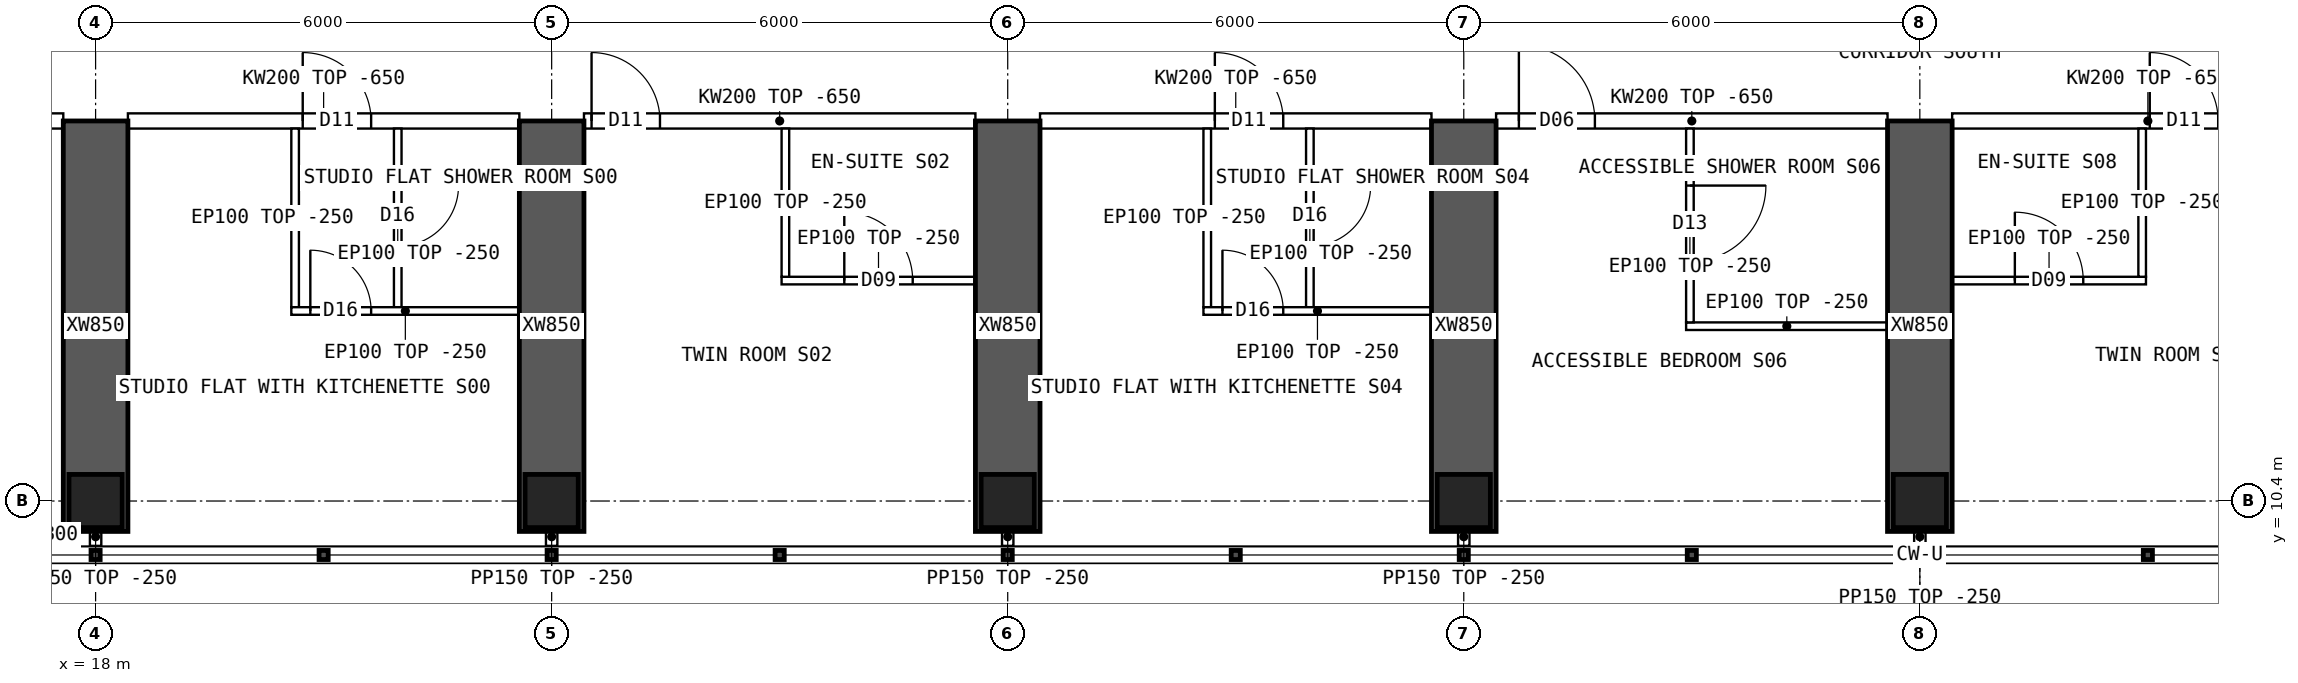
"""IFC4 building model, lengths in metres.
Left out: names, types, materials, properties, quantities, classifications, styles, units other than length and angle.
Written with IfcOpenShell. Run it as: python <this file> out.ifc"""

import sys

from ifc_helpers import new_model, si_unit, direction, frame, frame_2d, origin, origin_2d, place, context, subcontext, project, spatial, polyline, rectangle, hollow_rectangle, outline, extrude, element, fill, save


model = new_model("IFC4")
c1 = context("Model", 3, precision=1e-05, world=origin(), true_north=direction((0.0, 1.0)))
c2 = subcontext(c1, "Body", "Model", "MODEL_VIEW")
j1 = project(units=[si_unit("LENGTHUNIT", "METRE"), si_unit("PLANEANGLEUNIT", "RADIAN")], contexts=[c1])
p1 = place(None, origin())
s1 = spatial("IfcSite", under=j1, at=p1, CompositionType="ELEMENT")
p2 = place(p1, origin())
s2 = spatial("IfcBuilding", under=s1, at=p2, CompositionType="ELEMENT")
p3 = place(p2, frame((0.0, 0.0, 163.6)))
s3 = spatial("IfcBuildingStorey", under=s2, at=p3, CompositionType="ELEMENT", Elevation=163.6)
for number, where, z_axis, x_axis in (
    (1, (18.0, 10.4, 0.0), (0.0, 0.0, 1.0), (1.0, 0.0, 0.0)),
    (2, (24.0, 10.4, 0.0), (0.0, 0.0, 1.0), (1.0, 0.0, 0.0)),
    (3, (30.0, 10.4, 0.0), (0.0, 0.0, 1.0), (1.0, 0.0, 0.0)),
    (4, (36.0, 10.4, 0.0), (0.0, 0.0, 1.0), (1.0, 0.0, 0.0)),
    (5, (42.0, 10.4, 0.0), (0.0, 0.0, 1.0), (1.0, 0.0, 0.0)),
):
    element("IfcColumn", number, at=place(p3, frame(where, z_axis=z_axis, x_axis=x_axis)), inside=s3, PredefinedType="COLUMN", context=c2, shape_type="SweptSolid", body=[
        extrude(hollow_rectangle(XDim=0.7, YDim=0.7, WallThickness=0.07, at=origin_2d()), origin(), (0.0, 0.0, 1.0), 3.75),
    ])
for number, where, z_axis, x_axis in (
    (6, (18.0, 10.0, 0.0), (0.0, 0.0, 1.0), (0.0, 1.0, 0.0)),
    (7, (24.0, 10.0, 0.0), (0.0, 0.0, 1.0), (0.0, 1.0, 0.0)),
    (8, (30.0, 10.0, 0.0), (0.0, 0.0, 1.0), (0.0, 1.0, 0.0)),
    (9, (36.0, 10.0, 0.0), (0.0, 0.0, 1.0), (0.0, 1.0, 0.0)),
    (10, (42.0, 10.0, 0.0), (0.0, 0.0, 1.0), (0.0, 1.0, 0.0)),
):
    element("IfcWall", number, at=place(p3, frame(where, z_axis=z_axis, x_axis=x_axis)), inside=s3, PredefinedType="SHEAR", context=c2, shape_type="SweptSolid", body=[
        extrude(rectangle(XDim=5.4, YDim=0.85, at=frame_2d((2.7, 0.0))), origin(), (0.0, 0.0, 1.0), 3.75),
    ])
p4 = place(p3, frame((17.2, 9.95, 0.0), z_axis=(0.0, 0.0, 1.0), x_axis=(1.0, 0.0, 0.0)))
e11 = element("IfcWall", 11, at=p4, inside=s3, PredefinedType="SOLIDWALL", context=c2, shape_type="SweptSolid", body=[
    extrude(rectangle(XDim=0.375, YDim=0.3, at=frame_2d((0.188, 0.0))), origin(), (0.0, 0.0, 1.0), 3.5),
])
p5 = place(p3, frame((15.6, 15.4, 0.0), z_axis=(0.0, 0.0, 1.0), x_axis=(1.0, 0.0, 0.0)))
e12 = element("IfcWall", 12, at=p5, inside=s3, PredefinedType="SOLIDWALL", context=c2, shape_type="SweptSolid", body=[
    extrude(rectangle(XDim=1.975, YDim=0.2, at=frame_2d((0.987, 0.0))), origin(), (0.0, 0.0, 1.0), 3.5),
])
p6 = place(p5, frame((0.875, 0.0, 0.0)))
e13 = element("IfcOpeningElement", 13, at=p6, cuts=e12, PredefinedType="OPENING", context=c2, shape_type="SweptSolid", body=[
    extrude(rectangle(XDim=0.9, YDim=2.1, at=frame_2d((0.45, 1.05))), frame((0.0, 0.11, 0.0), z_axis=(0.0, -1.0, 0.0), x_axis=(1.0, 0.0, 0.0)), (0.0, 0.0, 1.0), 0.22),
])
p7 = place(p3, frame((18.425, 15.4, 0.0), z_axis=(0.0, 0.0, 1.0), x_axis=(1.0, 0.0, 0.0)))
e14 = element("IfcWall", 14, at=p7, inside=s3, PredefinedType="SOLIDWALL", context=c2, shape_type="SweptSolid", body=[
    extrude(outline(polyline([(0.0, 0.0), (5.15, 0.0), (5.15, 3.1), (0.0, 3.1), (0.0, 0.0)])), frame((0.0, 0.1, 0.0), z_axis=(0.0, -1.0, 0.0), x_axis=(1.0, 0.0, 0.0)), (0.0, 0.0, 1.0), 0.2),
])
p8 = place(p7, frame((2.3, 0.0, 0.0)))
e15 = element("IfcOpeningElement", 15, at=p8, cuts=e14, PredefinedType="OPENING", context=c2, shape_type="SweptSolid", body=[
    extrude(rectangle(XDim=0.9, YDim=2.1, at=frame_2d((0.45, 1.05))), frame((0.0, 0.11, 0.0), z_axis=(0.0, -1.0, 0.0), x_axis=(1.0, 0.0, 0.0)), (0.0, 0.0, 1.0), 0.22),
])
p9 = place(p3, frame((24.425, 15.4, 0.0), z_axis=(0.0, 0.0, 1.0), x_axis=(1.0, 0.0, 0.0)))
e16 = element("IfcWall", 16, at=p9, inside=s3, PredefinedType="SOLIDWALL", context=c2, shape_type="SweptSolid", body=[
    extrude(outline(polyline([(0.0, 0.0), (5.15, 0.0), (5.15, 3.1), (0.0, 3.1), (0.0, 0.0)])), frame((0.0, 0.1, 0.0), z_axis=(0.0, -1.0, 0.0), x_axis=(1.0, 0.0, 0.0)), (0.0, 0.0, 1.0), 0.2),
])
p10 = place(p9, frame((0.1, 0.0, 0.0)))
e17 = element("IfcOpeningElement", 17, at=p10, cuts=e16, PredefinedType="OPENING", context=c2, shape_type="SweptSolid", body=[
    extrude(rectangle(XDim=0.9, YDim=2.1, at=frame_2d((0.45, 1.05))), frame((0.0, 0.11, 0.0), z_axis=(0.0, -1.0, 0.0), x_axis=(1.0, 0.0, 0.0)), (0.0, 0.0, 1.0), 0.22),
])
p11 = place(p3, frame((30.425, 15.4, 0.0), z_axis=(0.0, 0.0, 1.0), x_axis=(1.0, 0.0, 0.0)))
e18 = element("IfcWall", 18, at=p11, inside=s3, PredefinedType="SOLIDWALL", context=c2, shape_type="SweptSolid", body=[
    extrude(outline(polyline([(0.0, 0.0), (5.15, 0.0), (5.15, 3.1), (0.0, 3.1), (0.0, 0.0)])), frame((0.0, 0.1, 0.0), z_axis=(0.0, -1.0, 0.0), x_axis=(1.0, 0.0, 0.0)), (0.0, 0.0, 1.0), 0.2),
])
p12 = place(p11, frame((2.3, 0.0, 0.0)))
e19 = element("IfcOpeningElement", 19, at=p12, cuts=e18, PredefinedType="OPENING", context=c2, shape_type="SweptSolid", body=[
    extrude(rectangle(XDim=0.9, YDim=2.1, at=frame_2d((0.45, 1.05))), frame((0.0, 0.11, 0.0), z_axis=(0.0, -1.0, 0.0), x_axis=(1.0, 0.0, 0.0)), (0.0, 0.0, 1.0), 0.22),
])
p13 = place(p3, frame((36.425, 15.4, 0.0), z_axis=(0.0, 0.0, 1.0), x_axis=(1.0, 0.0, 0.0)))
e20 = element("IfcWall", 20, at=p13, inside=s3, PredefinedType="SOLIDWALL", context=c2, shape_type="SweptSolid", body=[
    extrude(outline(polyline([(0.0, 0.0), (5.15, 0.0), (5.15, 3.1), (0.0, 3.1), (0.0, 0.0)])), frame((0.0, 0.1, 0.0), z_axis=(0.0, -1.0, 0.0), x_axis=(1.0, 0.0, 0.0)), (0.0, 0.0, 1.0), 0.2),
])
p14 = place(p13, frame((0.3, 0.0, 0.0)))
e21 = element("IfcOpeningElement", 21, at=p14, cuts=e20, PredefinedType="OPENING", context=c2, shape_type="SweptSolid", body=[
    extrude(rectangle(XDim=1.0, YDim=2.1, at=frame_2d((0.5, 1.05))), frame((0.0, 0.11, 0.0), z_axis=(0.0, -1.0, 0.0), x_axis=(1.0, 0.0, 0.0)), (0.0, 0.0, 1.0), 0.22),
])
p15 = place(p3, frame((42.425, 15.4, 0.0), z_axis=(0.0, 0.0, 1.0), x_axis=(1.0, 0.0, 0.0)))
e22 = element("IfcWall", 22, at=p15, inside=s3, PredefinedType="SOLIDWALL", context=c2, shape_type="SweptSolid", body=[
    extrude(outline(polyline([(0.0, 0.0), (5.15, 0.0), (5.15, 3.1), (0.0, 3.1), (0.0, 0.0)])), frame((0.0, 0.1, 0.0), z_axis=(0.0, -1.0, 0.0), x_axis=(1.0, 0.0, 0.0)), (0.0, 0.0, 1.0), 0.2),
])
p16 = place(p15, frame((2.6, 0.0, 0.0)))
e23 = element("IfcOpeningElement", 23, at=p16, cuts=e22, PredefinedType="OPENING", context=c2, shape_type="SweptSolid", body=[
    extrude(rectangle(XDim=0.9, YDim=2.1, at=frame_2d((0.45, 1.05))), frame((0.0, 0.11, 0.0), z_axis=(0.0, -1.0, 0.0), x_axis=(1.0, 0.0, 0.0)), (0.0, 0.0, 1.0), 0.22),
])
p17 = place(p3, frame((23.575, 12.9, 0.0), z_axis=(0.0, 0.0, 1.0), x_axis=(-1.0, 0.0, 0.0)))
e24 = element("IfcWall", 24, at=p17, inside=s3, PredefinedType="PARTITIONING", context=c2, shape_type="SweptSolid", body=[
    extrude(rectangle(XDim=3.0, YDim=0.1, at=frame_2d((1.5, 0.0))), origin(), (0.0, 0.0, 1.0), 3.5),
])
p18 = place(p17, frame((1.95, 0.0, 0.0)))
e25 = element("IfcOpeningElement", 25, at=p18, cuts=e24, PredefinedType="OPENING", context=c2, shape_type="SweptSolid", body=[
    extrude(rectangle(XDim=0.8, YDim=2.1, at=frame_2d((0.4, 1.05))), frame((0.0, 0.06, 0.0), z_axis=(0.0, -1.0, 0.0), x_axis=(1.0, 0.0, 0.0)), (0.0, 0.0, 1.0), 0.12),
])
p19 = place(p3, frame((20.625, 12.95, 0.0), z_axis=(0.0, 0.0, 1.0), x_axis=(0.0, 1.0, 0.0)))
e26 = element("IfcWall", 26, at=p19, inside=s3, PredefinedType="PARTITIONING", context=c2, shape_type="SweptSolid", body=[
    extrude(outline(polyline([(0.0, 0.0), (2.35, 0.0), (2.35, 3.1), (2.302, 3.1), (2.3, 3.5), (0.0, 3.5), (0.0, 0.0)])), frame((0.0, 0.05, 0.0), z_axis=(0.0, -1.0, 0.0), x_axis=(1.0, 0.0, 0.0)), (0.0, 0.0, 1.0), 0.1),
])
p20 = place(p3, frame((21.975, 12.95, 0.0), z_axis=(0.0, 0.0, 1.0), x_axis=(0.0, 1.0, 0.0)))
e27 = element("IfcWall", 27, at=p20, inside=s3, PredefinedType="PARTITIONING", context=c2, shape_type="SweptSolid", body=[
    extrude(outline(polyline([(0.0, 0.0), (2.35, 0.0), (2.35, 3.1), (2.302, 3.1), (2.3, 3.5), (0.0, 3.5), (0.0, 0.0)])), frame((0.0, 0.05, 0.0), z_axis=(0.0, -1.0, 0.0), x_axis=(1.0, 0.0, 0.0)), (0.0, 0.0, 1.0), 0.1),
])
p21 = place(p20, frame((0.8, 0.0, 0.0)))
e28 = element("IfcOpeningElement", 28, at=p21, cuts=e27, PredefinedType="OPENING", context=c2, shape_type="SweptSolid", body=[
    extrude(rectangle(XDim=0.8, YDim=2.1, at=frame_2d((0.4, 1.05))), frame((0.0, 0.06, 0.0), z_axis=(0.0, -1.0, 0.0), x_axis=(1.0, 0.0, 0.0)), (0.0, 0.0, 1.0), 0.12),
])
p22 = place(p3, frame((29.575, 13.3, 0.0), z_axis=(0.0, 0.0, 1.0), x_axis=(-1.0, 0.0, 0.0)))
e29 = element("IfcWall", 29, at=p22, inside=s3, PredefinedType="PARTITIONING", context=c2, shape_type="SweptSolid", body=[
    extrude(rectangle(XDim=2.55, YDim=0.1, at=frame_2d((1.275, 0.0))), origin(), (0.0, 0.0, 1.0), 3.5),
])
p23 = place(p22, frame((0.825, 0.0, 0.0)))
e30 = element("IfcOpeningElement", 30, at=p23, cuts=e29, PredefinedType="OPENING", context=c2, shape_type="SweptSolid", body=[
    extrude(rectangle(XDim=0.9, YDim=2.1, at=frame_2d((0.45, 1.05))), frame((0.0, 0.06, 0.0), z_axis=(0.0, -1.0, 0.0), x_axis=(1.0, 0.0, 0.0)), (0.0, 0.0, 1.0), 0.12),
])
p24 = place(p3, frame((27.075, 13.35, 0.0), z_axis=(0.0, 0.0, 1.0), x_axis=(0.0, 1.0, 0.0)))
e31 = element("IfcWall", 31, at=p24, inside=s3, PredefinedType="PARTITIONING", context=c2, shape_type="SweptSolid", body=[
    extrude(outline(polyline([(0.0, 0.0), (1.95, 0.0), (1.95, 3.1), (1.902, 3.1), (1.9, 3.5), (0.0, 3.5), (0.0, 0.0)])), frame((0.0, 0.05, 0.0), z_axis=(0.0, -1.0, 0.0), x_axis=(1.0, 0.0, 0.0)), (0.0, 0.0, 1.0), 0.1),
])
p25 = place(p3, frame((35.575, 12.9, 0.0), z_axis=(0.0, 0.0, 1.0), x_axis=(-1.0, 0.0, 0.0)))
e32 = element("IfcWall", 32, at=p25, inside=s3, PredefinedType="PARTITIONING", context=c2, shape_type="SweptSolid", body=[
    extrude(rectangle(XDim=3.0, YDim=0.1, at=frame_2d((1.5, 0.0))), origin(), (0.0, 0.0, 1.0), 3.5),
])
p26 = place(p25, frame((1.95, 0.0, 0.0)))
e33 = element("IfcOpeningElement", 33, at=p26, cuts=e32, PredefinedType="OPENING", context=c2, shape_type="SweptSolid", body=[
    extrude(rectangle(XDim=0.8, YDim=2.1, at=frame_2d((0.4, 1.05))), frame((0.0, 0.06, 0.0), z_axis=(0.0, -1.0, 0.0), x_axis=(1.0, 0.0, 0.0)), (0.0, 0.0, 1.0), 0.12),
])
p27 = place(p3, frame((32.625, 12.95, 0.0), z_axis=(0.0, 0.0, 1.0), x_axis=(0.0, 1.0, 0.0)))
e34 = element("IfcWall", 34, at=p27, inside=s3, PredefinedType="PARTITIONING", context=c2, shape_type="SweptSolid", body=[
    extrude(outline(polyline([(0.0, 0.0), (2.35, 0.0), (2.35, 3.1), (2.302, 3.1), (2.3, 3.5), (0.0, 3.5), (0.0, 0.0)])), frame((0.0, 0.05, 0.0), z_axis=(0.0, -1.0, 0.0), x_axis=(1.0, 0.0, 0.0)), (0.0, 0.0, 1.0), 0.1),
])
p28 = place(p3, frame((33.975, 12.95, 0.0), z_axis=(0.0, 0.0, 1.0), x_axis=(0.0, 1.0, 0.0)))
e35 = element("IfcWall", 35, at=p28, inside=s3, PredefinedType="PARTITIONING", context=c2, shape_type="SweptSolid", body=[
    extrude(outline(polyline([(0.0, 0.0), (2.35, 0.0), (2.35, 3.1), (2.302, 3.1), (2.3, 3.5), (0.0, 3.5), (0.0, 0.0)])), frame((0.0, 0.05, 0.0), z_axis=(0.0, -1.0, 0.0), x_axis=(1.0, 0.0, 0.0)), (0.0, 0.0, 1.0), 0.1),
])
p29 = place(p28, frame((0.8, 0.0, 0.0)))
e36 = element("IfcOpeningElement", 36, at=p29, cuts=e35, PredefinedType="OPENING", context=c2, shape_type="SweptSolid", body=[
    extrude(rectangle(XDim=0.8, YDim=2.1, at=frame_2d((0.4, 1.05))), frame((0.0, 0.06, 0.0), z_axis=(0.0, -1.0, 0.0), x_axis=(1.0, 0.0, 0.0)), (0.0, 0.0, 1.0), 0.12),
])
p30 = place(p3, frame((38.925, 12.7, 0.0), z_axis=(0.0, 0.0, 1.0), x_axis=(1.0, 0.0, 0.0)))
e37 = element("IfcWall", 37, at=p30, inside=s3, PredefinedType="PARTITIONING", context=c2, shape_type="SweptSolid", body=[
    extrude(rectangle(XDim=2.65, YDim=0.1, at=frame_2d((1.325, 0.0))), origin(), (0.0, 0.0, 1.0), 3.5),
])
p31 = place(p3, frame((38.975, 12.75, 0.0), z_axis=(0.0, 0.0, 1.0), x_axis=(0.0, 1.0, 0.0)))
e38 = element("IfcWall", 38, at=p31, inside=s3, PredefinedType="PARTITIONING", context=c2, shape_type="SweptSolid", body=[
    extrude(outline(polyline([(0.0, 0.0), (2.55, 0.0), (2.55, 3.1), (2.502, 3.1), (2.5, 3.5), (0.0, 3.5), (0.0, 0.0)])), frame((0.0, 0.05, 0.0), z_axis=(0.0, -1.0, 0.0), x_axis=(1.0, 0.0, 0.0)), (0.0, 0.0, 1.0), 0.1),
])
p32 = place(p31, frame((0.8, 0.0, 0.0)))
e39 = element("IfcOpeningElement", 39, at=p32, cuts=e38, PredefinedType="OPENING", context=c2, shape_type="SweptSolid", body=[
    extrude(rectangle(XDim=1.0, YDim=2.1, at=frame_2d((0.5, 1.05))), frame((0.0, 0.06, 0.0), z_axis=(0.0, -1.0, 0.0), x_axis=(1.0, 0.0, 0.0)), (0.0, 0.0, 1.0), 0.12),
])
p33 = place(p3, frame((44.975, 13.3, 0.0), z_axis=(0.0, 0.0, 1.0), x_axis=(-1.0, 0.0, 0.0)))
e40 = element("IfcWall", 40, at=p33, inside=s3, PredefinedType="PARTITIONING", context=c2, shape_type="SweptSolid", body=[
    extrude(rectangle(XDim=2.55, YDim=0.1, at=frame_2d((1.275, 0.0))), origin(), (0.0, 0.0, 1.0), 3.5),
])
p34 = place(p33, frame((0.825, 0.0, 0.0)))
e41 = element("IfcOpeningElement", 41, at=p34, cuts=e40, PredefinedType="OPENING", context=c2, shape_type="SweptSolid", body=[
    extrude(rectangle(XDim=0.9, YDim=2.1, at=frame_2d((0.45, 1.05))), frame((0.0, 0.06, 0.0), z_axis=(0.0, -1.0, 0.0), x_axis=(1.0, 0.0, 0.0)), (0.0, 0.0, 1.0), 0.12),
])
p35 = place(p3, frame((44.925, 13.35, 0.0), z_axis=(0.0, 0.0, 1.0), x_axis=(0.0, 1.0, 0.0)))
e42 = element("IfcWall", 42, at=p35, inside=s3, PredefinedType="PARTITIONING", context=c2, shape_type="SweptSolid", body=[
    extrude(outline(polyline([(0.0, 0.0), (1.95, 0.0), (1.95, 3.1), (1.902, 3.1), (1.9, 3.5), (0.0, 3.5), (0.0, 0.0)])), frame((0.0, 0.05, 0.0), z_axis=(0.0, -1.0, 0.0), x_axis=(1.0, 0.0, 0.0)), (0.0, 0.0, 1.0), 0.1),
])
for number, where, z_axis, x_axis in (
    (43, (18.0, 10.05, 0.0), (0.0, 0.0, 1.0), (0.0, -1.0, 0.0)),
    (44, (24.0, 10.05, 0.0), (0.0, 0.0, 1.0), (0.0, -1.0, 0.0)),
    (45, (30.0, 10.05, 0.0), (0.0, 0.0, 1.0), (0.0, -1.0, 0.0)),
    (46, (36.0, 10.05, 0.0), (0.0, 0.0, 1.0), (0.0, -1.0, 0.0)),
    (47, (42.0, 10.05, 0.0), (0.0, 0.0, 1.0), (0.0, -1.0, 0.0)),
):
    element("IfcWall", number, at=place(p3, frame(where, z_axis=z_axis, x_axis=x_axis)), inside=s3, PredefinedType="PARTITIONING", context=c2, shape_type="SweptSolid", body=[
        extrude(rectangle(XDim=0.24, YDim=0.15, at=frame_2d((0.12, 0.0))), origin(), (0.0, 0.0, 1.0), 3.5),
    ])
p36 = place(p18, origin())
e48 = element("IfcDoor", 48, at=p36, inside=s3, OperationType="SINGLE_SWING_RIGHT", PredefinedType="DOOR", context=c2, shape_type="SweptSolid", body=[
    extrude(rectangle(XDim=0.8, YDim=2.1, at=frame_2d((0.4, 1.05))), frame((0.0, 0.025, 0.0), z_axis=(0.0, -1.0, 0.0), x_axis=(1.0, 0.0, 0.0)), (0.0, 0.0, 1.0), 0.05),
])
fill(e25, e48)
p37 = place(p21, origin())
e49 = element("IfcDoor", 49, at=p37, inside=s3, OperationType="SINGLE_SWING_RIGHT", PredefinedType="DOOR", context=c2, shape_type="SweptSolid", body=[
    extrude(rectangle(XDim=0.8, YDim=2.1, at=frame_2d((0.4, 1.05))), frame((0.0, 0.025, 0.0), z_axis=(0.0, -1.0, 0.0), x_axis=(1.0, 0.0, 0.0)), (0.0, 0.0, 1.0), 0.05),
])
fill(e28, e49)
p38 = place(p8, origin())
e50 = element("IfcDoor", 50, at=p38, inside=s3, OperationType="SINGLE_SWING_LEFT", PredefinedType="DOOR", context=c2, shape_type="SweptSolid", body=[
    extrude(rectangle(XDim=0.9, YDim=2.1, at=frame_2d((0.45, 1.05))), frame((0.0, 0.025, 0.0), z_axis=(0.0, -1.0, 0.0), x_axis=(1.0, 0.0, 0.0)), (0.0, 0.0, 1.0), 0.05),
])
fill(e15, e50)
p39 = place(p23, origin())
e51 = element("IfcDoor", 51, at=p39, inside=s3, OperationType="SINGLE_SWING_RIGHT", PredefinedType="DOOR", context=c2, shape_type="SweptSolid", body=[
    extrude(rectangle(XDim=0.9, YDim=2.1, at=frame_2d((0.45, 1.05))), frame((0.0, 0.025, 0.0), z_axis=(0.0, -1.0, 0.0), x_axis=(1.0, 0.0, 0.0)), (0.0, 0.0, 1.0), 0.05),
])
fill(e30, e51)
p40 = place(p10, origin())
e52 = element("IfcDoor", 52, at=p40, inside=s3, OperationType="SINGLE_SWING_LEFT", PredefinedType="DOOR", context=c2, shape_type="SweptSolid", body=[
    extrude(rectangle(XDim=0.9, YDim=2.1, at=frame_2d((0.45, 1.05))), frame((0.0, 0.025, 0.0), z_axis=(0.0, -1.0, 0.0), x_axis=(1.0, 0.0, 0.0)), (0.0, 0.0, 1.0), 0.05),
])
fill(e17, e52)
p41 = place(p26, origin())
e53 = element("IfcDoor", 53, at=p41, inside=s3, OperationType="SINGLE_SWING_RIGHT", PredefinedType="DOOR", context=c2, shape_type="SweptSolid", body=[
    extrude(rectangle(XDim=0.8, YDim=2.1, at=frame_2d((0.4, 1.05))), frame((0.0, 0.025, 0.0), z_axis=(0.0, -1.0, 0.0), x_axis=(1.0, 0.0, 0.0)), (0.0, 0.0, 1.0), 0.05),
])
fill(e33, e53)
p42 = place(p29, origin())
e54 = element("IfcDoor", 54, at=p42, inside=s3, OperationType="SINGLE_SWING_RIGHT", PredefinedType="DOOR", context=c2, shape_type="SweptSolid", body=[
    extrude(rectangle(XDim=0.8, YDim=2.1, at=frame_2d((0.4, 1.05))), frame((0.0, 0.025, 0.0), z_axis=(0.0, -1.0, 0.0), x_axis=(1.0, 0.0, 0.0)), (0.0, 0.0, 1.0), 0.05),
])
fill(e36, e54)
p43 = place(p12, origin())
e55 = element("IfcDoor", 55, at=p43, inside=s3, OperationType="SINGLE_SWING_LEFT", PredefinedType="DOOR", context=c2, shape_type="SweptSolid", body=[
    extrude(rectangle(XDim=0.9, YDim=2.1, at=frame_2d((0.45, 1.05))), frame((0.0, 0.025, 0.0), z_axis=(0.0, -1.0, 0.0), x_axis=(1.0, 0.0, 0.0)), (0.0, 0.0, 1.0), 0.05),
])
fill(e19, e55)
p44 = place(p32, origin())
e56 = element("IfcDoor", 56, at=p44, inside=s3, OperationType="SINGLE_SWING_RIGHT", PredefinedType="DOOR", context=c2, shape_type="SweptSolid", body=[
    extrude(rectangle(XDim=1.0, YDim=2.1, at=frame_2d((0.5, 1.05))), frame((0.0, 0.025, 0.0), z_axis=(0.0, -1.0, 0.0), x_axis=(1.0, 0.0, 0.0)), (0.0, 0.0, 1.0), 0.05),
])
fill(e39, e56)
p45 = place(p14, origin())
e57 = element("IfcDoor", 57, at=p45, inside=s3, OperationType="SINGLE_SWING_LEFT", PredefinedType="DOOR", context=c2, shape_type="SweptSolid", body=[
    extrude(rectangle(XDim=1.0, YDim=2.1, at=frame_2d((0.5, 1.05))), frame((0.0, 0.025, 0.0), z_axis=(0.0, -1.0, 0.0), x_axis=(1.0, 0.0, 0.0)), (0.0, 0.0, 1.0), 0.05),
])
fill(e21, e57)
p46 = place(p34, origin())
e58 = element("IfcDoor", 58, at=p46, inside=s3, OperationType="SINGLE_SWING_RIGHT", PredefinedType="DOOR", context=c2, shape_type="SweptSolid", body=[
    extrude(rectangle(XDim=0.9, YDim=2.1, at=frame_2d((0.45, 1.05))), frame((0.0, 0.025, 0.0), z_axis=(0.0, -1.0, 0.0), x_axis=(1.0, 0.0, 0.0)), (0.0, 0.0, 1.0), 0.05),
])
fill(e41, e58)
p47 = place(p16, origin())
e59 = element("IfcDoor", 59, at=p47, inside=s3, OperationType="SINGLE_SWING_LEFT", PredefinedType="DOOR", context=c2, shape_type="SweptSolid", body=[
    extrude(rectangle(XDim=0.9, YDim=2.1, at=frame_2d((0.45, 1.05))), frame((0.0, 0.025, 0.0), z_axis=(0.0, -1.0, 0.0), x_axis=(1.0, 0.0, 0.0)), (0.0, 0.0, 1.0), 0.05),
])
fill(e23, e59)
save(model, sys.argv[1])
